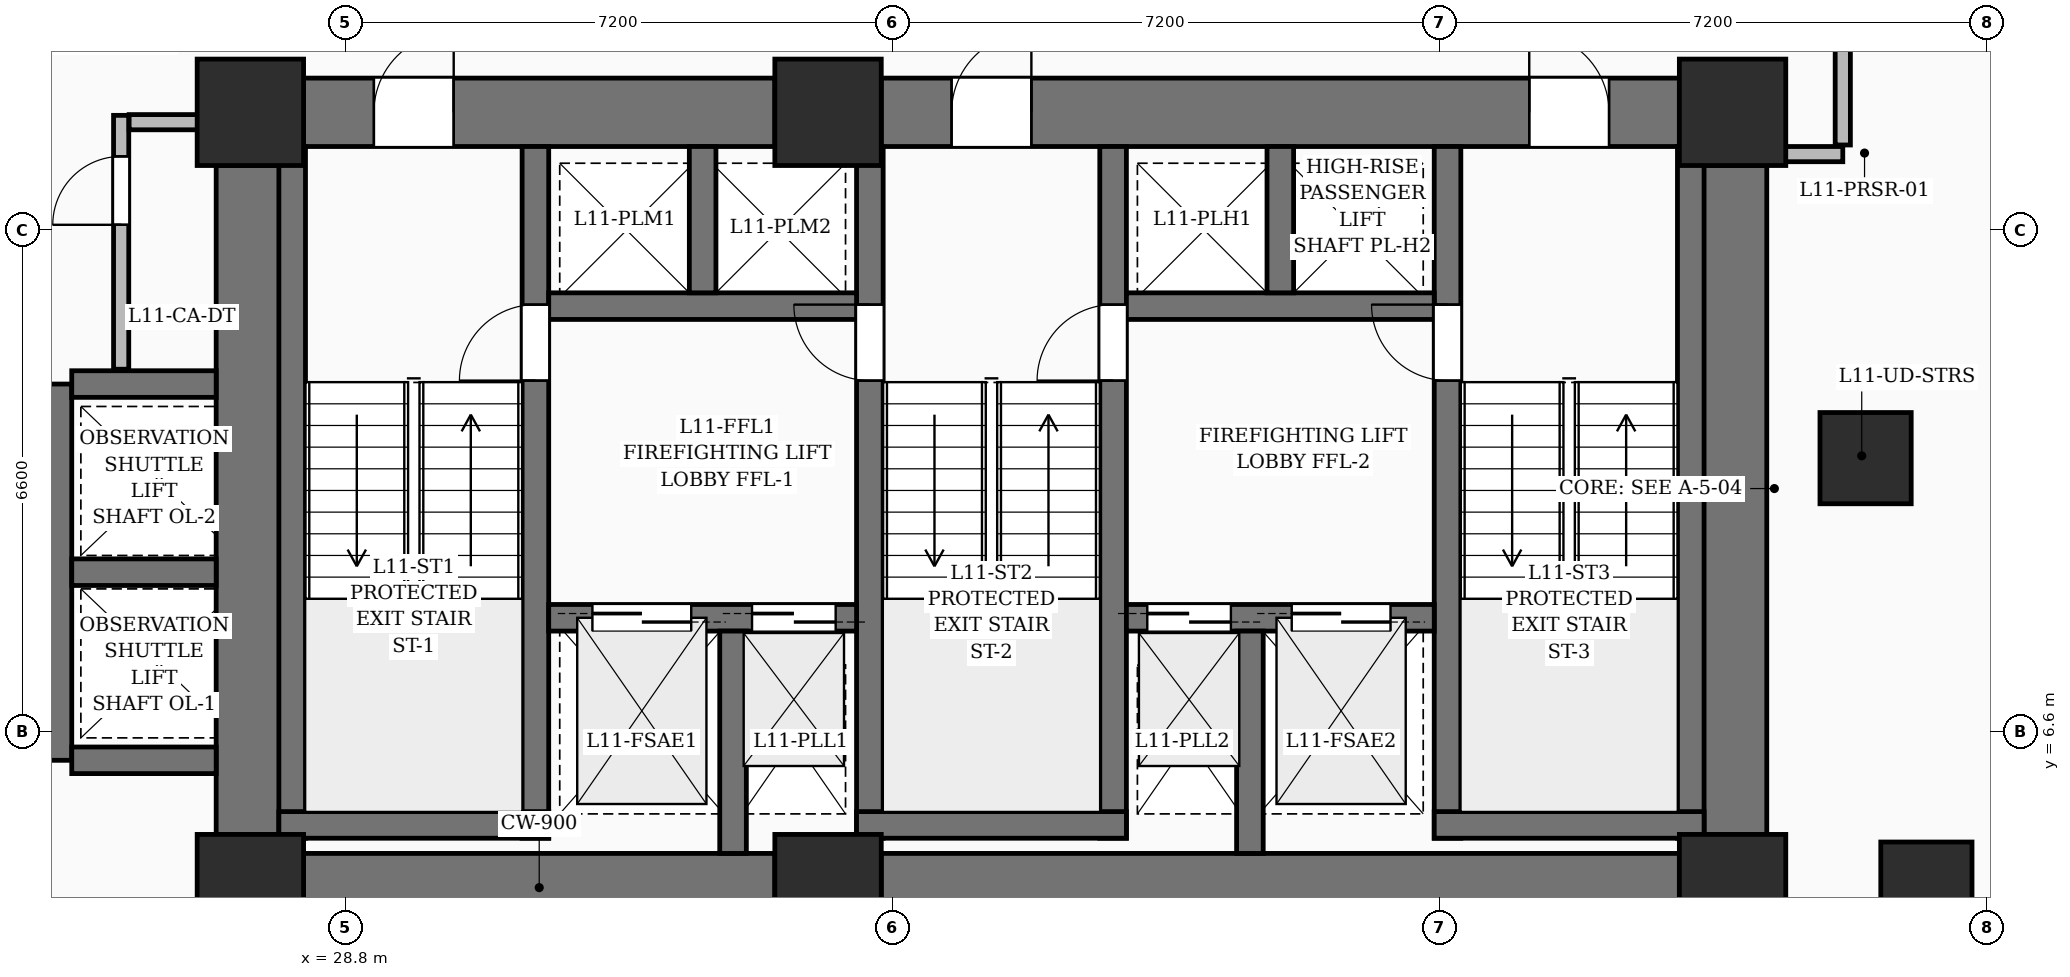
"""IFC4 building model, lengths in metres.
Left out: names, types, materials, properties, quantities, classifications, styles, units other than length and angle.
Written with IfcOpenShell. Run it as: python <this file> out.ifc"""

import sys

from ifc_helpers import new_model, si_unit, direction, frame, frame_2d, origin, origin_2d, place, context, subcontext, project, spatial, rectangle, extrude, element, fill, save


model = new_model("IFC4")
c1 = context("Model", 3, precision=1e-05, world=origin(), true_north=direction((0.0, 1.0)))
c2 = subcontext(c1, "Body", "Model", "MODEL_VIEW")
j1 = project(units=[si_unit("LENGTHUNIT", "METRE"), si_unit("PLANEANGLEUNIT", "RADIAN")], contexts=[c1])
p1 = place(None, origin())
s1 = spatial("IfcSite", under=j1, at=p1, CompositionType="ELEMENT")
p2 = place(p1, origin())
s2 = spatial("IfcBuilding", under=s1, at=p2, CompositionType="ELEMENT")
p3 = place(p2, frame((0.0, 0.0, 49.8)))
s3 = spatial("IfcBuildingStorey", under=s2, at=p3, CompositionType="ELEMENT", Elevation=49.8)
for number, where, z_axis, x_axis in (
    (1, (27.55, 4.55, 0.0), (0.0, 0.0, 1.0), (1.0, 0.0, 0.0)),
    (2, (35.15, 4.55, 0.0), (0.0, 0.0, 1.0), (1.0, 0.0, 0.0)),
    (3, (47.05, 4.55, 0.0), (0.0, 0.0, 1.0), (1.0, 0.0, 0.0)),
    (4, (27.55, 14.75, 0.0), (0.0, 0.0, 1.0), (1.0, 0.0, 0.0)),
    (5, (35.15, 14.75, 0.0), (0.0, 0.0, 1.0), (1.0, 0.0, 0.0)),
    (6, (47.05, 14.75, 0.0), (0.0, 0.0, 1.0), (1.0, 0.0, 0.0)),
):
    element("IfcColumn", number, at=place(p3, frame(where, z_axis=z_axis, x_axis=x_axis)), inside=s3, PredefinedType="COLUMN", context=c2, shape_type="SweptSolid", body=[
        extrude(rectangle(XDim=1.4, YDim=1.4, at=origin_2d()), origin(), (0.0, 0.0, 1.0), 3.6),
    ])
for number, where, z_axis, x_axis in (
    (7, (49.6, 4.55, 0.0), (0.0, 0.0, 1.0), (1.0, 0.0, 0.0)),
    (8, (48.8, 10.2, 0.0), (0.0, 0.0, 1.0), (1.0, 0.0, 0.0)),
):
    element("IfcColumn", number, at=place(p3, frame(where, z_axis=z_axis, x_axis=x_axis)), inside=s3, PredefinedType="COLUMN", context=c2, shape_type="SweptSolid", body=[
        extrude(rectangle(XDim=1.2, YDim=1.2, at=origin_2d()), origin(), (0.0, 0.0, 1.0), 3.6),
    ])
p4 = place(p3, frame((28.25, 4.55, 0.0), z_axis=(0.0, 0.0, 1.0), x_axis=(1.0, 0.0, 0.0)))
e9 = element("IfcWall", 9, at=p4, inside=s3, PredefinedType="SHEAR", context=c2, shape_type="SweptSolid", body=[
    extrude(rectangle(XDim=6.2, YDim=0.9, at=frame_2d((3.1, 0.0))), origin(), (0.0, 0.0, 1.0), 3.6),
])
p5 = place(p3, frame((35.85, 4.55, 0.0), z_axis=(0.0, 0.0, 1.0), x_axis=(1.0, 0.0, 0.0)))
e10 = element("IfcWall", 10, at=p5, inside=s3, PredefinedType="SHEAR", context=c2, shape_type="SweptSolid", body=[
    extrude(rectangle(XDim=10.5, YDim=0.9, at=frame_2d((5.25, 0.0))), origin(), (0.0, 0.0, 1.0), 3.6),
])
p6 = place(p3, frame((28.25, 14.75, 0.0), z_axis=(0.0, 0.0, 1.0), x_axis=(1.0, 0.0, 0.0)))
e11 = element("IfcWall", 11, at=p6, inside=s3, PredefinedType="SHEAR", context=c2, shape_type="SweptSolid", body=[
    extrude(rectangle(XDim=6.2, YDim=0.9, at=frame_2d((3.1, 0.0))), origin(), (0.0, 0.0, 1.0), 3.6),
])
p7 = place(p6, frame((0.925, 0.0, 0.0)))
e12 = element("IfcOpeningElement", 12, at=p7, cuts=e11, PredefinedType="OPENING", context=c2, shape_type="SweptSolid", body=[
    extrude(rectangle(XDim=1.05, YDim=2.15, at=frame_2d((0.525, 1.075))), frame((0.0, 0.46, 0.0), z_axis=(0.0, -1.0, 0.0), x_axis=(1.0, 0.0, 0.0)), (0.0, 0.0, 1.0), 0.92),
])
p8 = place(p3, frame((35.85, 14.75, 0.0), z_axis=(0.0, 0.0, 1.0), x_axis=(1.0, 0.0, 0.0)))
e13 = element("IfcWall", 13, at=p8, inside=s3, PredefinedType="SHEAR", context=c2, shape_type="SweptSolid", body=[
    extrude(rectangle(XDim=10.5, YDim=0.9, at=frame_2d((5.25, 0.0))), origin(), (0.0, 0.0, 1.0), 3.6),
])
p9 = place(p8, frame((0.925, 0.0, 0.0)))
e14 = element("IfcOpeningElement", 14, at=p9, cuts=e13, PredefinedType="OPENING", context=c2, shape_type="SweptSolid", body=[
    extrude(rectangle(XDim=1.05, YDim=2.15, at=frame_2d((0.525, 1.075))), frame((0.0, 0.46, 0.0), z_axis=(0.0, -1.0, 0.0), x_axis=(1.0, 0.0, 0.0)), (0.0, 0.0, 1.0), 0.92),
])
p10 = place(p8, frame((8.525, 0.0, 0.0)))
e15 = element("IfcOpeningElement", 15, at=p10, cuts=e13, PredefinedType="OPENING", context=c2, shape_type="SweptSolid", body=[
    extrude(rectangle(XDim=1.05, YDim=2.15, at=frame_2d((0.525, 1.075))), frame((0.0, 0.46, 0.0), z_axis=(0.0, -1.0, 0.0), x_axis=(1.0, 0.0, 0.0)), (0.0, 0.0, 1.0), 0.92),
])
for number, where, z_axis, x_axis in (
    (16, (27.55, 5.25, 0.0), (0.0, 0.0, 1.0), (0.0, 1.0, 0.0)),
    (17, (47.05, 5.25, 0.0), (0.0, 0.0, 1.0), (0.0, 1.0, 0.0)),
):
    element("IfcWall", number, at=place(p3, frame(where, z_axis=z_axis, x_axis=x_axis)), inside=s3, PredefinedType="SHEAR", context=c2, shape_type="SweptSolid", body=[
        extrude(rectangle(XDim=8.8, YDim=0.9, at=frame_2d((4.4, 0.0))), origin(), (0.0, 0.0, 1.0), 3.6),
    ])
p11 = place(p3, frame((28.1, 5.2, 0.0), z_axis=(0.0, 0.0, 1.0), x_axis=(0.0, 1.0, 0.0)))
e18 = element("IfcWall", 18, at=p11, inside=s3, PredefinedType="SOLIDWALL", context=c2, shape_type="SweptSolid", body=[
    extrude(rectangle(XDim=9.1, YDim=0.35, at=frame_2d((4.55, 0.0))), origin(), (0.0, 0.0, 1.0), 3.6),
])
p12 = place(p3, frame((31.3, 5.2, 0.0), z_axis=(0.0, 0.0, 1.0), x_axis=(0.0, 1.0, 0.0)))
e19 = element("IfcWall", 19, at=p12, inside=s3, PredefinedType="SOLIDWALL", context=c2, shape_type="SweptSolid", body=[
    extrude(rectangle(XDim=9.1, YDim=0.35, at=frame_2d((4.55, 0.0))), origin(), (0.0, 0.0, 1.0), 3.6),
])
p13 = place(p12, frame((6.02, 0.0, 0.0)))
e20 = element("IfcOpeningElement", 20, at=p13, cuts=e19, PredefinedType="OPENING", context=c2, shape_type="SweptSolid", body=[
    extrude(rectangle(XDim=1.0, YDim=2.15, at=frame_2d((0.5, 1.075))), frame((0.0, 0.185, 0.0), z_axis=(0.0, -1.0, 0.0), x_axis=(1.0, 0.0, 0.0)), (0.0, 0.0, 1.0), 0.37),
])
p14 = place(p3, frame((27.925, 5.375, 0.0), z_axis=(0.0, 0.0, 1.0), x_axis=(1.0, 0.0, 0.0)))
e21 = element("IfcWall", 21, at=p14, inside=s3, PredefinedType="SOLIDWALL", context=c2, shape_type="SweptSolid", body=[
    extrude(rectangle(XDim=3.55, YDim=0.35, at=frame_2d((1.775, 0.0))), origin(), (0.0, 0.0, 1.0), 3.6),
])
p15 = place(p3, frame((35.7, 5.2, 0.0), z_axis=(0.0, 0.0, 1.0), x_axis=(0.0, 1.0, 0.0)))
e22 = element("IfcWall", 22, at=p15, inside=s3, PredefinedType="SOLIDWALL", context=c2, shape_type="SweptSolid", body=[
    extrude(rectangle(XDim=9.1, YDim=0.35, at=frame_2d((4.55, 0.0))), origin(), (0.0, 0.0, 1.0), 3.6),
])
p16 = place(p15, frame((6.02, 0.0, 0.0)))
e23 = element("IfcOpeningElement", 23, at=p16, cuts=e22, PredefinedType="OPENING", context=c2, shape_type="SweptSolid", body=[
    extrude(rectangle(XDim=1.0, YDim=2.15, at=frame_2d((0.5, 1.075))), frame((0.0, 0.185, 0.0), z_axis=(0.0, -1.0, 0.0), x_axis=(1.0, 0.0, 0.0)), (0.0, 0.0, 1.0), 0.37),
])
p17 = place(p3, frame((38.9, 5.2, 0.0), z_axis=(0.0, 0.0, 1.0), x_axis=(0.0, 1.0, 0.0)))
e24 = element("IfcWall", 24, at=p17, inside=s3, PredefinedType="SOLIDWALL", context=c2, shape_type="SweptSolid", body=[
    extrude(rectangle(XDim=9.1, YDim=0.35, at=frame_2d((4.55, 0.0))), origin(), (0.0, 0.0, 1.0), 3.6),
])
p18 = place(p17, frame((6.02, 0.0, 0.0)))
e25 = element("IfcOpeningElement", 25, at=p18, cuts=e24, PredefinedType="OPENING", context=c2, shape_type="SweptSolid", body=[
    extrude(rectangle(XDim=1.0, YDim=2.15, at=frame_2d((0.5, 1.075))), frame((0.0, 0.185, 0.0), z_axis=(0.0, -1.0, 0.0), x_axis=(1.0, 0.0, 0.0)), (0.0, 0.0, 1.0), 0.37),
])
p19 = place(p3, frame((35.525, 5.375, 0.0), z_axis=(0.0, 0.0, 1.0), x_axis=(1.0, 0.0, 0.0)))
e26 = element("IfcWall", 26, at=p19, inside=s3, PredefinedType="SOLIDWALL", context=c2, shape_type="SweptSolid", body=[
    extrude(rectangle(XDim=3.55, YDim=0.35, at=frame_2d((1.775, 0.0))), origin(), (0.0, 0.0, 1.0), 3.6),
])
p20 = place(p3, frame((43.3, 5.2, 0.0), z_axis=(0.0, 0.0, 1.0), x_axis=(0.0, 1.0, 0.0)))
e27 = element("IfcWall", 27, at=p20, inside=s3, PredefinedType="SOLIDWALL", context=c2, shape_type="SweptSolid", body=[
    extrude(rectangle(XDim=9.1, YDim=0.35, at=frame_2d((4.55, 0.0))), origin(), (0.0, 0.0, 1.0), 3.6),
])
p21 = place(p20, frame((6.02, 0.0, 0.0)))
e28 = element("IfcOpeningElement", 28, at=p21, cuts=e27, PredefinedType="OPENING", context=c2, shape_type="SweptSolid", body=[
    extrude(rectangle(XDim=1.0, YDim=2.15, at=frame_2d((0.5, 1.075))), frame((0.0, 0.185, 0.0), z_axis=(0.0, -1.0, 0.0), x_axis=(1.0, 0.0, 0.0)), (0.0, 0.0, 1.0), 0.37),
])
p22 = place(p3, frame((46.5, 5.2, 0.0), z_axis=(0.0, 0.0, 1.0), x_axis=(0.0, 1.0, 0.0)))
e29 = element("IfcWall", 29, at=p22, inside=s3, PredefinedType="SOLIDWALL", context=c2, shape_type="SweptSolid", body=[
    extrude(rectangle(XDim=9.1, YDim=0.35, at=frame_2d((4.55, 0.0))), origin(), (0.0, 0.0, 1.0), 3.6),
])
p23 = place(p3, frame((43.125, 5.375, 0.0), z_axis=(0.0, 0.0, 1.0), x_axis=(1.0, 0.0, 0.0)))
e30 = element("IfcWall", 30, at=p23, inside=s3, PredefinedType="SOLIDWALL", context=c2, shape_type="SweptSolid", body=[
    extrude(rectangle(XDim=3.55, YDim=0.35, at=frame_2d((1.775, 0.0))), origin(), (0.0, 0.0, 1.0), 3.6),
])
p24 = place(p3, frame((31.475, 8.1, 0.0), z_axis=(0.0, 0.0, 1.0), x_axis=(1.0, 0.0, 0.0)))
e31 = element("IfcWall", 31, at=p24, inside=s3, PredefinedType="SOLIDWALL", context=c2, shape_type="SweptSolid", body=[
    extrude(rectangle(XDim=4.05, YDim=0.35, at=frame_2d((2.025, 0.0))), origin(), (0.0, 0.0, 1.0), 3.6),
])
p25 = place(p24, frame((0.575, 0.0, 0.0)))
e32 = element("IfcOpeningElement", 32, at=p25, cuts=e31, PredefinedType="OPENING", context=c2, shape_type="SweptSolid", body=[
    extrude(rectangle(XDim=1.3, YDim=2.25, at=frame_2d((0.65, 1.125))), frame((0.0, 0.185, 0.0), z_axis=(0.0, -1.0, 0.0), x_axis=(1.0, 0.0, 0.0)), (0.0, 0.0, 1.0), 0.37),
])
p26 = place(p24, frame((2.675, 0.0, 0.0)))
e33 = element("IfcOpeningElement", 33, at=p26, cuts=e31, PredefinedType="OPENING", context=c2, shape_type="SweptSolid", body=[
    extrude(rectangle(XDim=1.1, YDim=2.2, at=frame_2d((0.55, 1.1))), frame((0.0, 0.185, 0.0), z_axis=(0.0, -1.0, 0.0), x_axis=(1.0, 0.0, 0.0)), (0.0, 0.0, 1.0), 0.37),
])
p27 = place(p3, frame((39.075, 8.1, 0.0), z_axis=(0.0, 0.0, 1.0), x_axis=(1.0, 0.0, 0.0)))
e34 = element("IfcWall", 34, at=p27, inside=s3, PredefinedType="SOLIDWALL", context=c2, shape_type="SweptSolid", body=[
    extrude(rectangle(XDim=4.05, YDim=0.35, at=frame_2d((2.025, 0.0))), origin(), (0.0, 0.0, 1.0), 3.6),
])
p28 = place(p27, frame((2.175, 0.0, 0.0)))
e35 = element("IfcOpeningElement", 35, at=p28, cuts=e34, PredefinedType="OPENING", context=c2, shape_type="SweptSolid", body=[
    extrude(rectangle(XDim=1.3, YDim=2.25, at=frame_2d((0.65, 1.125))), frame((0.0, 0.185, 0.0), z_axis=(0.0, -1.0, 0.0), x_axis=(1.0, 0.0, 0.0)), (0.0, 0.0, 1.0), 0.37),
])
p29 = place(p27, frame((0.275, 0.0, 0.0)))
e36 = element("IfcOpeningElement", 36, at=p29, cuts=e34, PredefinedType="OPENING", context=c2, shape_type="SweptSolid", body=[
    extrude(rectangle(XDim=1.1, YDim=2.2, at=frame_2d((0.55, 1.1))), frame((0.0, 0.185, 0.0), z_axis=(0.0, -1.0, 0.0), x_axis=(1.0, 0.0, 0.0)), (0.0, 0.0, 1.0), 0.37),
])
for number, where, z_axis, x_axis in (
    (37, (33.9, 5.0, 0.0), (0.0, 0.0, 1.0), (0.0, 1.0, 0.0)),
    (38, (40.7, 5.0, 0.0), (0.0, 0.0, 1.0), (0.0, 1.0, 0.0)),
):
    element("IfcWall", number, at=place(p3, frame(where, z_axis=z_axis, x_axis=x_axis)), inside=s3, PredefinedType="SOLIDWALL", context=c2, shape_type="SweptSolid", body=[
        extrude(rectangle(XDim=2.925, YDim=0.35, at=frame_2d((1.462, 0.0))), origin(), (0.0, 0.0, 1.0), 3.6),
    ])
p30 = place(p3, frame((31.475, 12.2, 0.0), z_axis=(0.0, 0.0, 1.0), x_axis=(1.0, 0.0, 0.0)))
e39 = element("IfcWall", 39, at=p30, inside=s3, PredefinedType="SOLIDWALL", context=c2, shape_type="SweptSolid", body=[
    extrude(rectangle(XDim=4.05, YDim=0.35, at=frame_2d((2.025, 0.0))), origin(), (0.0, 0.0, 1.0), 3.6),
])
p31 = place(p3, frame((33.5, 12.375, 0.0), z_axis=(0.0, 0.0, 1.0), x_axis=(0.0, 1.0, 0.0)))
e40 = element("IfcWall", 40, at=p31, inside=s3, PredefinedType="SOLIDWALL", context=c2, shape_type="SweptSolid", body=[
    extrude(rectangle(XDim=1.925, YDim=0.35, at=frame_2d((0.962, 0.0))), origin(), (0.0, 0.0, 1.0), 3.6),
])
p32 = place(p3, frame((39.075, 12.2, 0.0), z_axis=(0.0, 0.0, 1.0), x_axis=(1.0, 0.0, 0.0)))
e41 = element("IfcWall", 41, at=p32, inside=s3, PredefinedType="SOLIDWALL", context=c2, shape_type="SweptSolid", body=[
    extrude(rectangle(XDim=4.05, YDim=0.35, at=frame_2d((2.025, 0.0))), origin(), (0.0, 0.0, 1.0), 3.6),
])
p33 = place(p3, frame((41.1, 12.375, 0.0), z_axis=(0.0, 0.0, 1.0), x_axis=(0.0, 1.0, 0.0)))
e42 = element("IfcWall", 42, at=p33, inside=s3, PredefinedType="SOLIDWALL", context=c2, shape_type="SweptSolid", body=[
    extrude(rectangle(XDim=1.925, YDim=0.35, at=frame_2d((0.962, 0.0))), origin(), (0.0, 0.0, 1.0), 3.6),
])
p34 = place(p3, frame((25.025, 6.225, 0.0), z_axis=(0.0, 0.0, 1.0), x_axis=(0.0, 1.0, 0.0)))
e43 = element("IfcWall", 43, at=p34, inside=s3, PredefinedType="SOLIDWALL", context=c2, shape_type="SweptSolid", body=[
    extrude(rectangle(XDim=4.95, YDim=0.35, at=frame_2d((2.475, 0.0))), origin(), (0.0, 0.0, 1.0), 3.6),
])
for number, where, z_axis, x_axis in (
    (44, (25.2, 6.225, 0.0), (0.0, 0.0, 1.0), (1.0, 0.0, 0.0)),
    (45, (25.2, 8.7, 0.0), (0.0, 0.0, 1.0), (1.0, 0.0, 0.0)),
    (46, (25.2, 11.175, 0.0), (0.0, 0.0, 1.0), (1.0, 0.0, 0.0)),
):
    element("IfcWall", number, at=place(p3, frame(where, z_axis=z_axis, x_axis=x_axis)), inside=s3, PredefinedType="SOLIDWALL", context=c2, shape_type="SweptSolid", body=[
        extrude(rectangle(XDim=1.9, YDim=0.35, at=frame_2d((0.95, 0.0))), origin(), (0.0, 0.0, 1.0), 3.6),
    ])
p35 = place(p3, frame((25.85, 11.37, 0.0), z_axis=(0.0, 0.0, 1.0), x_axis=(0.0, 1.0, 0.0)))
e47 = element("IfcWall", 47, at=p35, inside=s3, PredefinedType="PARTITIONING", context=c2, shape_type="SweptSolid", body=[
    extrude(rectangle(XDim=3.34, YDim=0.2, at=frame_2d((1.67, 0.0))), origin(), (0.0, 0.0, 1.0), 3.35),
])
p36 = place(p35, frame((1.9, 0.0, 0.0)))
e48 = element("IfcOpeningElement", 48, at=p36, cuts=e47, PredefinedType="OPENING", context=c2, shape_type="SweptSolid", body=[
    extrude(rectangle(XDim=0.9, YDim=2.1, at=frame_2d((0.45, 1.05))), frame((0.0, 0.11, 0.0), z_axis=(0.0, -1.0, 0.0), x_axis=(1.0, 0.0, 0.0)), (0.0, 0.0, 1.0), 0.22),
])
p37 = place(p3, frame((25.955, 14.62, 0.0), z_axis=(0.0, 0.0, 1.0), x_axis=(1.0, 0.0, 0.0)))
e49 = element("IfcWall", 49, at=p37, inside=s3, PredefinedType="PARTITIONING", context=c2, shape_type="SweptSolid", body=[
    extrude(rectangle(XDim=1.13, YDim=0.2, at=frame_2d((0.565, 0.0))), origin(), (0.0, 0.0, 1.0), 3.35),
])
p38 = place(p3, frame((47.5, 14.2, 0.0), z_axis=(0.0, 0.0, 1.0), x_axis=(1.0, 0.0, 0.0)))
e50 = element("IfcWall", 50, at=p38, inside=s3, PredefinedType="PARTITIONING", context=c2, shape_type="SweptSolid", body=[
    extrude(rectangle(XDim=1.0, YDim=0.2, at=frame_2d((0.5, 0.0))), origin(), (0.0, 0.0, 1.0), 3.35),
])
p39 = place(p3, frame((48.5, 14.32, 0.0), z_axis=(0.0, 0.0, 1.0), x_axis=(0.0, 1.0, 0.0)))
e51 = element("IfcWall", 51, at=p39, inside=s3, PredefinedType="PARTITIONING", context=c2, shape_type="SweptSolid", body=[
    extrude(rectangle(XDim=3.28, YDim=0.2, at=frame_2d((1.64, 0.0))), origin(), (0.0, 0.0, 1.0), 1.12),
])
p40 = place(p7, origin())
e52 = element("IfcDoor", 52, at=p40, inside=s3, OperationType="SINGLE_SWING_RIGHT", PredefinedType="DOOR", context=c2, shape_type="SweptSolid", body=[
    extrude(rectangle(XDim=1.05, YDim=2.15, at=frame_2d((0.525, 1.075))), frame((0.0, 0.025, 0.0), z_axis=(0.0, -1.0, 0.0), x_axis=(1.0, 0.0, 0.0)), (0.0, 0.0, 1.0), 0.05),
])
fill(e12, e52)
p41 = place(p9, origin())
e53 = element("IfcDoor", 53, at=p41, inside=s3, OperationType="SINGLE_SWING_RIGHT", PredefinedType="DOOR", context=c2, shape_type="SweptSolid", body=[
    extrude(rectangle(XDim=1.05, YDim=2.15, at=frame_2d((0.525, 1.075))), frame((0.0, 0.025, 0.0), z_axis=(0.0, -1.0, 0.0), x_axis=(1.0, 0.0, 0.0)), (0.0, 0.0, 1.0), 0.05),
])
fill(e14, e53)
p42 = place(p10, origin())
e54 = element("IfcDoor", 54, at=p42, inside=s3, OperationType="SINGLE_SWING_LEFT", PredefinedType="DOOR", context=c2, shape_type="SweptSolid", body=[
    extrude(rectangle(XDim=1.05, YDim=2.15, at=frame_2d((0.525, 1.075))), frame((0.0, 0.025, 0.0), z_axis=(0.0, -1.0, 0.0), x_axis=(1.0, 0.0, 0.0)), (0.0, 0.0, 1.0), 0.05),
])
fill(e15, e54)
p43 = place(p13, origin())
e55 = element("IfcDoor", 55, at=p43, inside=s3, OperationType="SINGLE_SWING_LEFT", PredefinedType="DOOR", context=c2, shape_type="SweptSolid", body=[
    extrude(rectangle(XDim=1.0, YDim=2.15, at=frame_2d((0.5, 1.075))), frame((0.0, 0.025, 0.0), z_axis=(0.0, -1.0, 0.0), x_axis=(1.0, 0.0, 0.0)), (0.0, 0.0, 1.0), 0.05),
])
fill(e20, e55)
p44 = place(p16, origin())
e56 = element("IfcDoor", 56, at=p44, inside=s3, OperationType="SINGLE_SWING_RIGHT", PredefinedType="DOOR", context=c2, shape_type="SweptSolid", body=[
    extrude(rectangle(XDim=1.0, YDim=2.15, at=frame_2d((0.5, 1.075))), frame((0.0, 0.025, 0.0), z_axis=(0.0, -1.0, 0.0), x_axis=(1.0, 0.0, 0.0)), (0.0, 0.0, 1.0), 0.05),
])
fill(e23, e56)
p45 = place(p18, origin())
e57 = element("IfcDoor", 57, at=p45, inside=s3, OperationType="SINGLE_SWING_LEFT", PredefinedType="DOOR", context=c2, shape_type="SweptSolid", body=[
    extrude(rectangle(XDim=1.0, YDim=2.15, at=frame_2d((0.5, 1.075))), frame((0.0, 0.025, 0.0), z_axis=(0.0, -1.0, 0.0), x_axis=(1.0, 0.0, 0.0)), (0.0, 0.0, 1.0), 0.05),
])
fill(e25, e57)
p46 = place(p21, origin())
e58 = element("IfcDoor", 58, at=p46, inside=s3, OperationType="SINGLE_SWING_RIGHT", PredefinedType="DOOR", context=c2, shape_type="SweptSolid", body=[
    extrude(rectangle(XDim=1.0, YDim=2.15, at=frame_2d((0.5, 1.075))), frame((0.0, 0.025, 0.0), z_axis=(0.0, -1.0, 0.0), x_axis=(1.0, 0.0, 0.0)), (0.0, 0.0, 1.0), 0.05),
])
fill(e28, e58)
p47 = place(p25, origin())
e59 = element("IfcDoor", 59, at=p47, inside=s3, OperationType="DOUBLE_DOOR_SLIDING", PredefinedType="DOOR", context=c2, shape_type="SweptSolid", body=[
    extrude(rectangle(XDim=1.3, YDim=2.25, at=frame_2d((0.65, 1.125))), frame((0.0, 0.025, 0.0), z_axis=(0.0, -1.0, 0.0), x_axis=(1.0, 0.0, 0.0)), (0.0, 0.0, 1.0), 0.05),
])
fill(e32, e59)
p48 = place(p28, origin())
e60 = element("IfcDoor", 60, at=p48, inside=s3, OperationType="DOUBLE_DOOR_SLIDING", PredefinedType="DOOR", context=c2, shape_type="SweptSolid", body=[
    extrude(rectangle(XDim=1.3, YDim=2.25, at=frame_2d((0.65, 1.125))), frame((0.0, 0.025, 0.0), z_axis=(0.0, -1.0, 0.0), x_axis=(1.0, 0.0, 0.0)), (0.0, 0.0, 1.0), 0.05),
])
fill(e35, e60)
p49 = place(p26, origin())
e61 = element("IfcDoor", 61, at=p49, inside=s3, OperationType="DOUBLE_DOOR_SLIDING", PredefinedType="DOOR", context=c2, shape_type="SweptSolid", body=[
    extrude(rectangle(XDim=1.1, YDim=2.2, at=frame_2d((0.55, 1.1))), frame((0.0, 0.025, 0.0), z_axis=(0.0, -1.0, 0.0), x_axis=(1.0, 0.0, 0.0)), (0.0, 0.0, 1.0), 0.05),
])
fill(e33, e61)
p50 = place(p29, origin())
e62 = element("IfcDoor", 62, at=p50, inside=s3, OperationType="DOUBLE_DOOR_SLIDING", PredefinedType="DOOR", context=c2, shape_type="SweptSolid", body=[
    extrude(rectangle(XDim=1.1, YDim=2.2, at=frame_2d((0.55, 1.1))), frame((0.0, 0.025, 0.0), z_axis=(0.0, -1.0, 0.0), x_axis=(1.0, 0.0, 0.0)), (0.0, 0.0, 1.0), 0.05),
])
fill(e36, e62)
p51 = place(p36, origin())
e63 = element("IfcDoor", 63, at=p51, inside=s3, OperationType="SINGLE_SWING_LEFT", PredefinedType="DOOR", context=c2, shape_type="SweptSolid", body=[
    extrude(rectangle(XDim=0.9, YDim=2.1, at=frame_2d((0.45, 1.05))), frame((0.0, 0.025, 0.0), z_axis=(0.0, -1.0, 0.0), x_axis=(1.0, 0.0, 0.0)), (0.0, 0.0, 1.0), 0.05),
])
fill(e48, e63)
save(model, sys.argv[1])
